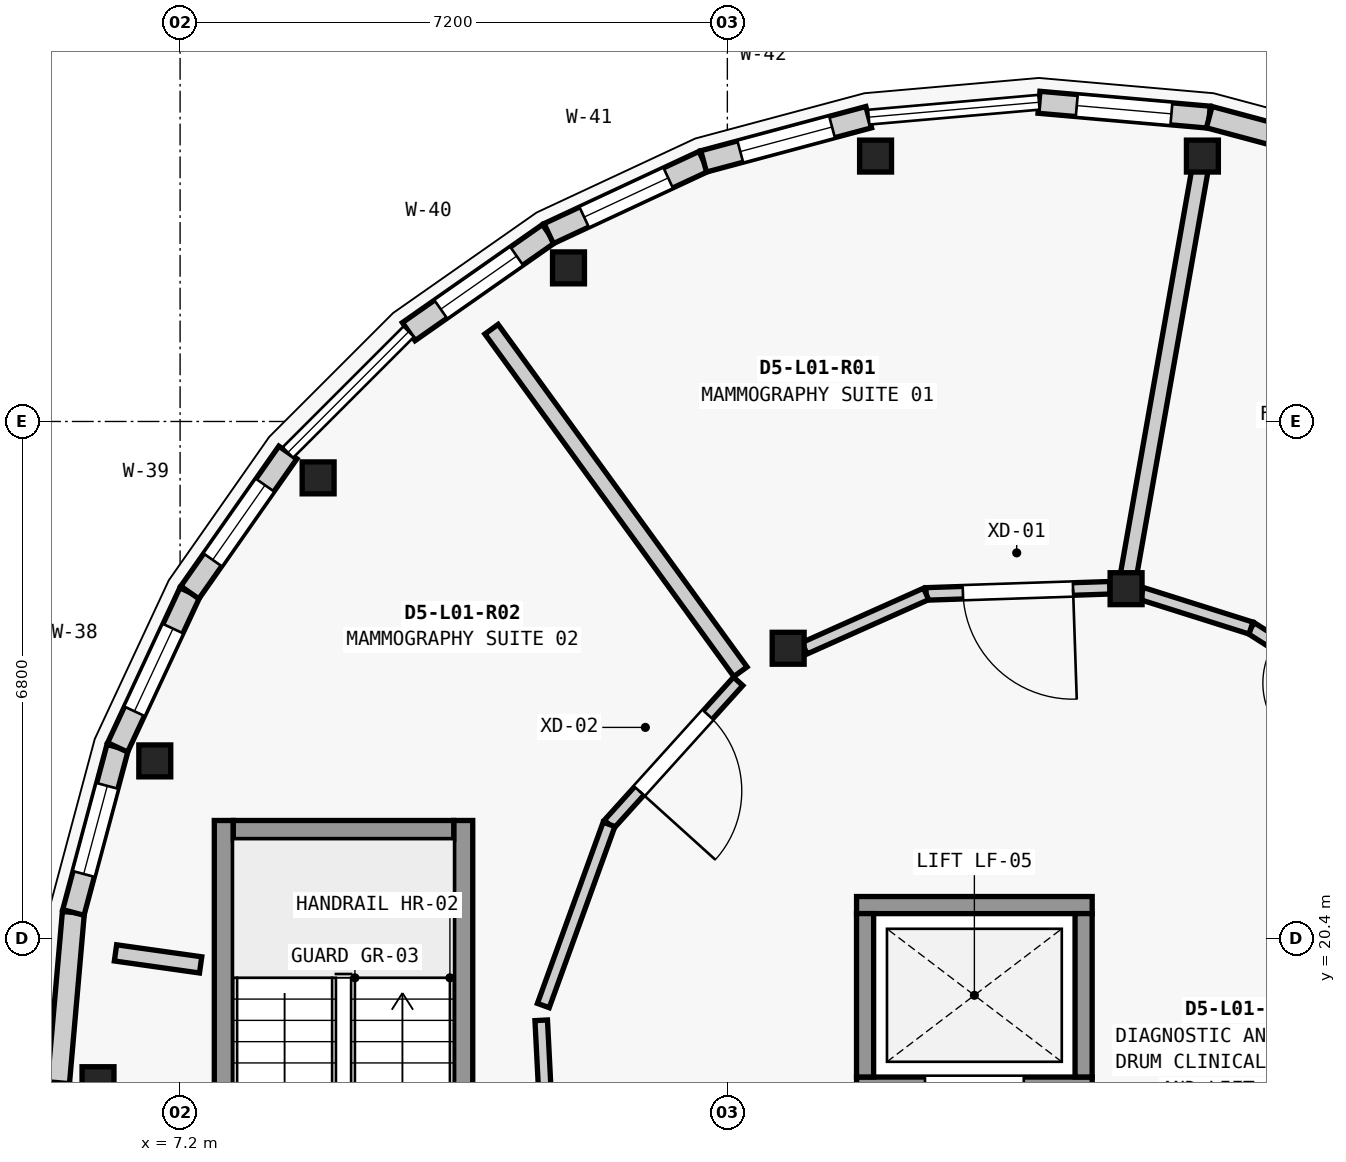
"""IFC4 building model, lengths in metres.
Left out: names, types, materials, properties, quantities, classifications, styles, units other than length and angle.
Written with IfcOpenShell. Run it as: python <this file> out.ifc"""

import sys

from ifc_helpers import new_model, si_unit, direction, frame, frame_2d, origin, origin_2d, place, context, subcontext, project, spatial, rectangle, extrude, element, fill, save


model = new_model("IFC4")
c1 = context("Model", 3, precision=1e-05, world=origin(), true_north=direction((0.0, 1.0)))
c2 = subcontext(c1, "Body", "Model", "MODEL_VIEW")
j1 = project(units=[si_unit("LENGTHUNIT", "METRE"), si_unit("PLANEANGLEUNIT", "RADIAN")], contexts=[c1])
p1 = place(None, origin())
s1 = spatial("IfcSite", under=j1, at=p1, CompositionType="ELEMENT")
p2 = place(p1, origin())
s2 = spatial("IfcBuilding", under=s1, at=p2, CompositionType="ELEMENT")
p3 = place(p2, frame((0.0, 0.0, 4.55)))
s3 = spatial("IfcBuildingStorey", under=s2, at=p3, CompositionType="ELEMENT", Elevation=4.55)
for number, where, z_axis, x_axis in (
    (1, (20.65, 30.692, 0.0), (0.0, 0.0, 1.0), (1.0, 0.0, 0.0)),
    (2, (16.35, 30.692, 0.0), (0.0, 0.0, 1.0), (1.0, 0.0, 0.0)),
    (3, (12.31, 29.221, 0.0), (0.0, 0.0, 1.0), (1.0, 0.0, 0.0)),
    (4, (9.016, 26.458, 0.0), (0.0, 0.0, 1.0), (1.0, 0.0, 0.0)),
    (5, (6.867, 22.734, 0.0), (0.0, 0.0, 1.0), (1.0, 0.0, 0.0)),
    (6, (6.12, 18.5, 0.0), (0.0, 0.0, 1.0), (1.0, 0.0, 0.0)),
    (7, (19.646, 25.0, 0.0), (0.0, 0.0, 1.0), (1.0, 0.0, 0.0)),
    (8, (15.2, 24.216, 0.0), (0.0, 0.0, 1.0), (1.0, 0.0, 0.0)),
):
    element("IfcColumn", number, at=place(p3, frame(where, z_axis=z_axis, x_axis=x_axis)), inside=s3, PredefinedType="COLUMN", context=c2, shape_type="SweptSolid", body=[
        extrude(rectangle(XDim=0.42, YDim=0.42, at=origin_2d()), origin(), (0.0, 0.0, 1.0), 4.2),
    ])
for number, where, z_axis, x_axis in (
    (9, (5.796, 16.26, 0.0), (0.0, 0.0, 1.0), (-0.087, 0.996, 0.0)),
    (10, (5.6, 18.5, 0.0), (0.0, 0.0, 1.0), (0.087, 0.996, 0.0)),
):
    element("IfcWall", number, at=place(p3, frame(where, z_axis=z_axis, x_axis=x_axis)), inside=s3, PredefinedType="ELEMENTEDWALL", context=c2, shape_type="SweptSolid", body=[
        extrude(rectangle(XDim=2.249, YDim=0.29, at=frame_2d((1.124, 0.0))), origin(), (0.0, 0.0, 1.0), 3.309),
    ])
p4 = place(p3, frame((5.796, 20.74, 0.0), z_axis=(0.0, 0.0, 1.0), x_axis=(0.258824721145, 0.96592430538, 0.0)))
e11 = element("IfcWall", 11, at=p4, inside=s3, PredefinedType="ELEMENTEDWALL", context=c2, shape_type="SweptSolid", body=[
    extrude(rectangle(XDim=2.249, YDim=0.29, at=frame_2d((1.125, 0.0))), origin(), (0.0, 0.0, 1.0), 3.309),
])
p5 = place(p4, frame((0.524, 0.0, 0.85)))
e12 = element("IfcOpeningElement", 12, at=p5, cuts=e11, PredefinedType="OPENING", context=c2, shape_type="SweptSolid", body=[
    extrude(rectangle(XDim=1.2, YDim=1.65, at=frame_2d((0.6, 0.825))), frame((0.0, 0.155, 0.0), z_axis=(0.0, -1.0, 0.0), x_axis=(1.0, 0.0, 0.0)), (0.0, 0.0, 1.0), 0.31),
])
p6 = place(p3, frame((6.378, 22.912, 0.0), z_axis=(0.0, 0.0, 1.0), x_axis=(0.422504983593, 0.906360600886, 0.0)))
e13 = element("IfcWall", 13, at=p6, inside=s3, PredefinedType="ELEMENTEDWALL", context=c2, shape_type="SweptSolid", body=[
    extrude(rectangle(XDim=2.248, YDim=0.29, at=frame_2d((1.124, 0.0))), origin(), (0.0, 0.0, 1.0), 3.309),
])
p7 = place(p6, frame((0.524, 0.0, 0.85)))
e14 = element("IfcOpeningElement", 14, at=p7, cuts=e13, PredefinedType="OPENING", context=c2, shape_type="SweptSolid", body=[
    extrude(rectangle(XDim=1.2, YDim=1.95, at=frame_2d((0.6, 0.975))), frame((0.0, 0.155, 0.0), z_axis=(0.0, -1.0, 0.0), x_axis=(1.0, 0.0, 0.0)), (0.0, 0.0, 1.0), 0.31),
])
p8 = place(p3, frame((7.328, 24.95, 0.0), z_axis=(0.0, 0.0, 1.0), x_axis=(0.573644482107, 0.819104393925, 0.0)))
e15 = element("IfcWall", 15, at=p8, inside=s3, PredefinedType="ELEMENTEDWALL", context=c2, shape_type="SweptSolid", body=[
    extrude(rectangle(XDim=2.249, YDim=0.29, at=frame_2d((1.125, 0.0))), origin(), (0.0, 0.0, 1.0), 3.309),
])
p9 = place(p8, frame((0.524, 0.0, 0.85)))
e16 = element("IfcOpeningElement", 16, at=p9, cuts=e15, PredefinedType="OPENING", context=c2, shape_type="SweptSolid", body=[
    extrude(rectangle(XDim=1.2, YDim=2.25, at=frame_2d((0.6, 1.125))), frame((0.0, 0.155, 0.0), z_axis=(0.0, -1.0, 0.0), x_axis=(1.0, 0.0, 0.0)), (0.0, 0.0, 1.0), 0.31),
])
p10 = place(p3, frame((10.208, 28.382, 0.0), z_axis=(0.0, 0.0, 1.0), x_axis=(0.819104393925, 0.573644482107, 0.0)))
e17 = element("IfcWall", 17, at=p10, inside=s3, PredefinedType="ELEMENTEDWALL", context=c2, shape_type="SweptSolid", body=[
    extrude(rectangle(XDim=2.249, YDim=0.29, at=frame_2d((1.125, 0.0))), origin(), (0.0, 0.0, 1.0), 3.309),
])
p11 = place(p10, frame((0.514, 0.0, 0.85)))
e18 = element("IfcOpeningElement", 18, at=p11, cuts=e17, PredefinedType="OPENING", context=c2, shape_type="SweptSolid", body=[
    extrude(rectangle(XDim=1.22, YDim=1.5, at=frame_2d((0.61, 0.75))), frame((0.0, 0.155, 0.0), z_axis=(0.0, -1.0, 0.0), x_axis=(1.0, 0.0, 0.0)), (0.0, 0.0, 1.0), 0.31),
])
p12 = place(p3, frame((12.05, 29.672, 0.0), z_axis=(0.0, 0.0, 1.0), x_axis=(0.906360600886, 0.422504983593, 0.0)))
e19 = element("IfcWall", 19, at=p12, inside=s3, PredefinedType="ELEMENTEDWALL", context=c2, shape_type="SweptSolid", body=[
    extrude(rectangle(XDim=2.248, YDim=0.29, at=frame_2d((1.124, 0.0))), origin(), (0.0, 0.0, 1.0), 3.309),
])
p13 = place(p12, frame((0.514, 0.0, 0.85)))
e20 = element("IfcOpeningElement", 20, at=p13, cuts=e19, PredefinedType="OPENING", context=c2, shape_type="SweptSolid", body=[
    extrude(rectangle(XDim=1.22, YDim=1.8, at=frame_2d((0.61, 0.9))), frame((0.0, 0.155, 0.0), z_axis=(0.0, -1.0, 0.0), x_axis=(1.0, 0.0, 0.0)), (0.0, 0.0, 1.0), 0.31),
])
p14 = place(p3, frame((14.088, 30.622, 0.0), z_axis=(0.0, 0.0, 1.0), x_axis=(0.96592430538, 0.258824721145, 0.0)))
e21 = element("IfcWall", 21, at=p14, inside=s3, PredefinedType="ELEMENTEDWALL", context=c2, shape_type="SweptSolid", body=[
    extrude(rectangle(XDim=2.249, YDim=0.29, at=frame_2d((1.125, 0.0))), origin(), (0.0, 0.0, 1.0), 3.309),
])
p15 = place(p14, frame((0.499, 0.0, 0.85)))
e22 = element("IfcOpeningElement", 22, at=p15, cuts=e21, PredefinedType="OPENING", context=c2, shape_type="SweptSolid", body=[
    extrude(rectangle(XDim=1.25, YDim=1.5, at=frame_2d((0.625, 0.75))), frame((0.0, 0.155, 0.0), z_axis=(0.0, -1.0, 0.0), x_axis=(1.0, 0.0, 0.0)), (0.0, 0.0, 1.0), 0.31),
])
p16 = place(p3, frame((18.5, 31.4, 0.0), z_axis=(0.0, 0.0, 1.0), x_axis=(0.996201374201, -0.087079400775, 0.0)))
e23 = element("IfcWall", 23, at=p16, inside=s3, PredefinedType="ELEMENTEDWALL", context=c2, shape_type="SweptSolid", body=[
    extrude(rectangle(XDim=2.249, YDim=0.29, at=frame_2d((1.124, 0.0))), origin(), (0.0, 0.0, 1.0), 3.309),
])
p17 = place(p16, frame((0.499, 0.0, 0.85)))
e24 = element("IfcOpeningElement", 24, at=p17, cuts=e23, PredefinedType="OPENING", context=c2, shape_type="SweptSolid", body=[
    extrude(rectangle(XDim=1.25, YDim=1.8, at=frame_2d((0.625, 0.9))), frame((0.0, 0.155, 0.0), z_axis=(0.0, -1.0, 0.0), x_axis=(1.0, 0.0, 0.0)), (0.0, 0.0, 1.0), 0.31),
])
p18 = place(p3, frame((20.74, 31.204, 0.0), z_axis=(0.0, 0.0, 1.0), x_axis=(0.96592430538, -0.258824721145, 0.0)))
e25 = element("IfcWall", 25, at=p18, inside=s3, PredefinedType="ELEMENTEDWALL", context=c2, shape_type="SweptSolid", body=[
    extrude(rectangle(XDim=2.249, YDim=0.29, at=frame_2d((1.125, 0.0))), origin(), (0.0, 0.0, 1.0), 3.309),
])
p19 = place(p3, frame((10.925, 15.05, 0.0), z_axis=(0.0, 0.0, 1.0), x_axis=(0.0, 1.0, 0.0)))
e26 = element("IfcWall", 26, at=p19, inside=s3, PredefinedType="SHEAR", context=c2, shape_type="SweptSolid", body=[
    extrude(rectangle(XDim=6.9, YDim=0.25, at=frame_2d((3.45, 0.0))), origin(), (0.0, 0.0, 1.0), 3.955),
])
p20 = place(p19, frame((0.43, 0.0, 0.0)))
e27 = element("IfcOpeningElement", 27, at=p20, cuts=e26, PredefinedType="OPENING", context=c2, shape_type="SweptSolid", body=[
    extrude(rectangle(XDim=1.1, YDim=2.15, at=frame_2d((0.55, 1.075))), frame((0.0, 0.135, 0.0), z_axis=(0.0, -1.0, 0.0), x_axis=(1.0, 0.0, 0.0)), (0.0, 0.0, 1.0), 0.27),
])
p21 = place(p3, frame((7.775, 15.05, 0.0), z_axis=(0.0, 0.0, 1.0), x_axis=(0.0, 1.0, 0.0)))
e28 = element("IfcWall", 28, at=p21, inside=s3, PredefinedType="SHEAR", context=c2, shape_type="SweptSolid", body=[
    extrude(rectangle(XDim=6.9, YDim=0.25, at=frame_2d((3.45, 0.0))), origin(), (0.0, 0.0, 1.0), 3.955),
])
p22 = place(p3, frame((10.8, 21.825, 0.0), z_axis=(0.0, 0.0, 1.0), x_axis=(-1.0, 0.0, 0.0)))
e29 = element("IfcWall", 29, at=p22, inside=s3, PredefinedType="SHEAR", context=c2, shape_type="SweptSolid", body=[
    extrude(rectangle(XDim=2.9, YDim=0.25, at=frame_2d((1.45, 0.0))), origin(), (0.0, 0.0, 1.0), 3.955),
])
p23 = place(p3, frame((16.1, 18.462, 0.0), z_axis=(0.0, 0.0, 1.0), x_axis=(1.0, 0.0, 0.0)))
e30 = element("IfcWall", 30, at=p23, inside=s3, PredefinedType="SHEAR", context=c2, shape_type="SweptSolid", body=[
    extrude(rectangle(XDim=3.1, YDim=0.225, at=frame_2d((1.55, 0.0))), origin(), (0.0, 0.0, 1.0), 3.955),
])
p24 = place(p23, frame((0.9, 0.0, 0.0)))
e31 = element("IfcOpeningElement", 31, at=p24, cuts=e30, PredefinedType="OPENING", context=c2, shape_type="SweptSolid", body=[
    extrude(rectangle(XDim=1.3, YDim=2.2, at=frame_2d((0.65, 1.1))), frame((0.0, 0.123, 0.0), z_axis=(0.0, -1.0, 0.0), x_axis=(1.0, 0.0, 0.0)), (0.0, 0.0, 1.0), 0.245),
])
p25 = place(p3, frame((16.1, 20.837, 0.0), z_axis=(0.0, 0.0, 1.0), x_axis=(1.0, 0.0, 0.0)))
e32 = element("IfcWall", 32, at=p25, inside=s3, PredefinedType="SHEAR", context=c2, shape_type="SweptSolid", body=[
    extrude(rectangle(XDim=3.1, YDim=0.225, at=frame_2d((1.55, 0.0))), origin(), (0.0, 0.0, 1.0), 3.955),
])
for number, where, z_axis, x_axis in (
    (33, (16.212, 18.575, 0.0), (0.0, 0.0, 1.0), (0.0, 1.0, 0.0)),
    (34, (19.087, 18.575, 0.0), (0.0, 0.0, 1.0), (0.0, 1.0, 0.0)),
):
    element("IfcWall", number, at=place(p3, frame(where, z_axis=z_axis, x_axis=x_axis)), inside=s3, PredefinedType="SHEAR", context=c2, shape_type="SweptSolid", body=[
        extrude(rectangle(XDim=2.15, YDim=0.225, at=frame_2d((1.075, 0.0))), origin(), (0.0, 0.0, 1.0), 3.955),
    ])
p26 = place(p3, frame((19.66, 25.081, 0.0), z_axis=(0.0, 0.0, 1.0), x_axis=(0.173787813666, 0.984783121211, 0.0)))
e35 = element("IfcWall", 35, at=p26, inside=s3, PredefinedType="SOLIDWALL", context=c2, shape_type="SweptSolid", body=[
    extrude(rectangle(XDim=5.616, YDim=0.215, at=frame_2d((2.808, 0.0))), origin(), (0.0, 0.0, 1.0), 3.284),
])
p27 = place(p3, frame((14.572, 23.907, 0.0), z_axis=(0.0, 0.0, 1.0), x_axis=(-0.58782249157, 0.808989937146, 0.0)))
e36 = element("IfcWall", 36, at=p27, inside=s3, PredefinedType="SOLIDWALL", context=c2, shape_type="SweptSolid", body=[
    extrude(rectangle(XDim=5.571, YDim=0.215, at=frame_2d((2.786, 0.0))), origin(), (0.0, 0.0, 1.0), 3.284),
])
p28 = place(p3, frame((7.47, 20.05, 0.0), z_axis=(0.0, 0.0, 1.0), x_axis=(-0.990198351661, 0.139668265429, 0.0)))
e37 = element("IfcWall", 37, at=p28, inside=s3, PredefinedType="SOLIDWALL", context=c2, shape_type="SweptSolid", body=[
    extrude(rectangle(XDim=1.131, YDim=0.215, at=frame_2d((0.565, 0.0))), origin(), (0.0, 0.0, 1.0), 3.284),
])
p29 = place(p3, frame((19.432, 25.012, 0.0), z_axis=(0.0, 0.0, 1.0), x_axis=(-0.999438163876, -0.033516512162, 0.0)))
e38 = element("IfcWall", 38, at=p29, inside=s3, PredefinedType="PARTITIONING", context=c2, shape_type="SweptSolid", body=[
    extrude(rectangle(XDim=2.418, YDim=0.165, at=frame_2d((1.209, 0.0))), origin(), (0.0, 0.0, 1.0), 3.284),
])
p30 = place(p29, frame((0.484, 0.0, 0.0)))
e39 = element("IfcOpeningElement", 39, at=p30, cuts=e38, PredefinedType="OPENING", context=c2, shape_type="SweptSolid", body=[
    extrude(rectangle(XDim=1.45, YDim=2.28, at=frame_2d((0.725, 1.14))), frame((0.0, 0.093, 0.0), z_axis=(0.0, -1.0, 0.0), x_axis=(1.0, 0.0, 0.0)), (0.0, 0.0, 1.0), 0.185),
])
p31 = place(p3, frame((17.015, 24.931, 0.0), z_axis=(0.0, 0.0, 1.0), x_axis=(-0.9130053983, -0.407947475389, 0.0)))
e40 = element("IfcWall", 40, at=p31, inside=s3, PredefinedType="PARTITIONING", context=c2, shape_type="SweptSolid", body=[
    extrude(rectangle(XDim=1.752, YDim=0.165, at=frame_2d((0.876, 0.0))), origin(), (0.0, 0.0, 1.0), 3.284),
])
p32 = place(p3, frame((14.542, 23.781, 0.0), z_axis=(0.0, 0.0, 1.0), x_axis=(-0.670075829694, -0.74229265284, 0.0)))
e41 = element("IfcWall", 41, at=p32, inside=s3, PredefinedType="PARTITIONING", context=c2, shape_type="SweptSolid", body=[
    extrude(rectangle(XDim=2.535, YDim=0.165, at=frame_2d((1.268, 0.0))), origin(), (0.0, 0.0, 1.0), 3.284),
])
p33 = place(p32, frame((0.593, 0.0, 0.0)))
e42 = element("IfcOpeningElement", 42, at=p33, cuts=e41, PredefinedType="OPENING", context=c2, shape_type="SweptSolid", body=[
    extrude(rectangle(XDim=1.35, YDim=2.22, at=frame_2d((0.675, 1.11))), frame((0.0, 0.093, 0.0), z_axis=(0.0, -1.0, 0.0), x_axis=(1.0, 0.0, 0.0)), (0.0, 0.0, 1.0), 0.185),
])
p34 = place(p3, frame((12.843, 21.899, 0.0), z_axis=(0.0, 0.0, 1.0), x_axis=(-0.34073018183, -0.940161126185, 0.0)))
e43 = element("IfcWall", 43, at=p34, inside=s3, PredefinedType="PARTITIONING", context=c2, shape_type="SweptSolid", body=[
    extrude(rectangle(XDim=2.536, YDim=0.165, at=frame_2d((1.268, 0.0))), origin(), (0.0, 0.0, 1.0), 3.284),
])
p35 = place(p3, frame((11.951, 19.321, 0.0), z_axis=(0.0, 0.0, 1.0), x_axis=(0.051214751973, -0.998687663477, 0.0)))
e44 = element("IfcWall", 44, at=p35, inside=s3, PredefinedType="PARTITIONING", context=c2, shape_type="SweptSolid", body=[
    extrude(rectangle(XDim=1.974, YDim=0.165, at=frame_2d((0.987, 0.0))), origin(), (0.0, 0.0, 1.0), 3.284),
])
p36 = place(p3, frame((22.735, 23.562, 0.0), z_axis=(0.0, 0.0, 1.0), x_axis=(-0.843737732446, 0.536755660283, 0.0)))
e45 = element("IfcWall", 45, at=p36, inside=s3, PredefinedType="PARTITIONING", context=c2, shape_type="SweptSolid", body=[
    extrude(rectangle(XDim=1.714, YDim=0.165, at=frame_2d((0.857, 0.0))), origin(), (0.0, 0.0, 1.0), 3.284),
])
p37 = place(p36, frame((0.367, 0.0, 0.0)))
e46 = element("IfcOpeningElement", 46, at=p37, cuts=e45, PredefinedType="OPENING", context=c2, shape_type="SweptSolid", body=[
    extrude(rectangle(XDim=0.98, YDim=2.1, at=frame_2d((0.49, 1.05))), frame((0.0, 0.093, 0.0), z_axis=(0.0, -1.0, 0.0), x_axis=(1.0, 0.0, 0.0)), (0.0, 0.0, 1.0), 0.185),
])
p38 = place(p3, frame((21.289, 24.482, 0.0), z_axis=(0.0, 0.0, 1.0), x_axis=(-0.953582665134, 0.301131367937, 0.0)))
e47 = element("IfcWall", 47, at=p38, inside=s3, PredefinedType="PARTITIONING", context=c2, shape_type="SweptSolid", body=[
    extrude(rectangle(XDim=1.508, YDim=0.165, at=frame_2d((0.754, 0.0))), origin(), (0.0, 0.0, 1.0), 3.284),
])
p39 = place(p5, origin())
e48 = element("IfcWindow", 48, at=p39, inside=s3, PartitioningType="SINGLE_PANEL", PredefinedType="WINDOW", context=c2, shape_type="SweptSolid", body=[
    extrude(rectangle(XDim=1.2, YDim=1.65, at=frame_2d((0.6, 0.825))), frame((0.0, 0.03, 0.0), z_axis=(0.0, -1.0, 0.0), x_axis=(1.0, 0.0, 0.0)), (0.0, 0.0, 1.0), 0.06),
])
fill(e12, e48)
p40 = place(p7, origin())
e49 = element("IfcWindow", 49, at=p40, inside=s3, PartitioningType="SINGLE_PANEL", PredefinedType="WINDOW", context=c2, shape_type="SweptSolid", body=[
    extrude(rectangle(XDim=1.2, YDim=1.95, at=frame_2d((0.6, 0.975))), frame((0.0, 0.03, 0.0), z_axis=(0.0, -1.0, 0.0), x_axis=(1.0, 0.0, 0.0)), (0.0, 0.0, 1.0), 0.06),
])
fill(e14, e49)
p41 = place(p9, origin())
e50 = element("IfcWindow", 50, at=p41, inside=s3, PartitioningType="SINGLE_PANEL", PredefinedType="WINDOW", context=c2, shape_type="SweptSolid", body=[
    extrude(rectangle(XDim=1.2, YDim=2.25, at=frame_2d((0.6, 1.125))), frame((0.0, 0.03, 0.0), z_axis=(0.0, -1.0, 0.0), x_axis=(1.0, 0.0, 0.0)), (0.0, 0.0, 1.0), 0.06),
])
fill(e16, e50)
p42 = place(p11, origin())
e51 = element("IfcWindow", 51, at=p42, inside=s3, PartitioningType="SINGLE_PANEL", PredefinedType="WINDOW", context=c2, shape_type="SweptSolid", body=[
    extrude(rectangle(XDim=1.22, YDim=1.5, at=frame_2d((0.61, 0.75))), frame((0.0, 0.03, 0.0), z_axis=(0.0, -1.0, 0.0), x_axis=(1.0, 0.0, 0.0)), (0.0, 0.0, 1.0), 0.06),
])
fill(e18, e51)
p43 = place(p13, origin())
e52 = element("IfcWindow", 52, at=p43, inside=s3, PartitioningType="SINGLE_PANEL", PredefinedType="WINDOW", context=c2, shape_type="SweptSolid", body=[
    extrude(rectangle(XDim=1.22, YDim=1.8, at=frame_2d((0.61, 0.9))), frame((0.0, 0.03, 0.0), z_axis=(0.0, -1.0, 0.0), x_axis=(1.0, 0.0, 0.0)), (0.0, 0.0, 1.0), 0.06),
])
fill(e20, e52)
p44 = place(p15, origin())
e53 = element("IfcWindow", 53, at=p44, inside=s3, PartitioningType="SINGLE_PANEL", PredefinedType="WINDOW", context=c2, shape_type="SweptSolid", body=[
    extrude(rectangle(XDim=1.25, YDim=1.5, at=frame_2d((0.625, 0.75))), frame((0.0, 0.03, 0.0), z_axis=(0.0, -1.0, 0.0), x_axis=(1.0, 0.0, 0.0)), (0.0, 0.0, 1.0), 0.06),
])
fill(e22, e53)
p45 = place(p17, origin())
e54 = element("IfcWindow", 54, at=p45, inside=s3, PartitioningType="SINGLE_PANEL", PredefinedType="WINDOW", context=c2, shape_type="SweptSolid", body=[
    extrude(rectangle(XDim=1.25, YDim=1.8, at=frame_2d((0.625, 0.9))), frame((0.0, 0.03, 0.0), z_axis=(0.0, -1.0, 0.0), x_axis=(1.0, 0.0, 0.0)), (0.0, 0.0, 1.0), 0.06),
])
fill(e24, e54)
p46 = place(p30, origin())
e55 = element("IfcDoor", 55, at=p46, inside=s3, OperationType="SINGLE_SWING_LEFT", PredefinedType="DOOR", context=c2, shape_type="SweptSolid", body=[
    extrude(rectangle(XDim=1.45, YDim=2.28, at=frame_2d((0.725, 1.14))), frame((0.0, 0.025, 0.0), z_axis=(0.0, -1.0, 0.0), x_axis=(1.0, 0.0, 0.0)), (0.0, 0.0, 1.0), 0.05),
])
fill(e39, e55)
p47 = place(p33, origin())
e56 = element("IfcDoor", 56, at=p47, inside=s3, OperationType="SINGLE_SWING_RIGHT", PredefinedType="DOOR", context=c2, shape_type="SweptSolid", body=[
    extrude(rectangle(XDim=1.35, YDim=2.22, at=frame_2d((0.675, 1.11))), frame((0.0, 0.025, 0.0), z_axis=(0.0, -1.0, 0.0), x_axis=(1.0, 0.0, 0.0)), (0.0, 0.0, 1.0), 0.05),
])
fill(e42, e56)
save(model, sys.argv[1])
